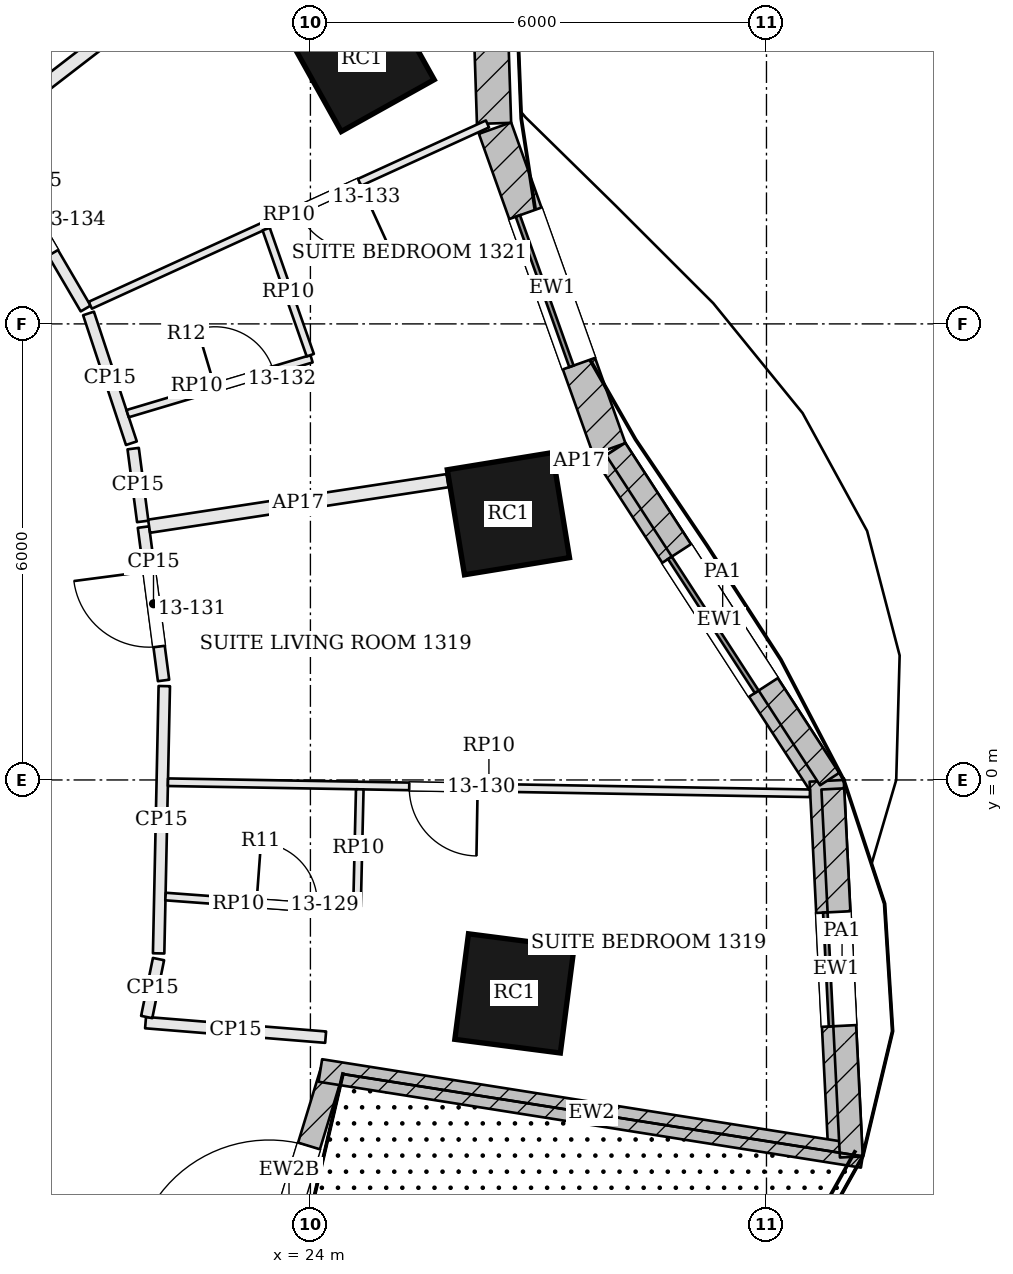
"""IFC4 building model, lengths in metres.
Left out: names, types, materials, properties, quantities, classifications, styles, units other than length and angle.
Written with IfcOpenShell. Run it as: python <this file> out.ifc"""

import sys

from ifc_helpers import new_model, si_unit, direction, frame, frame_2d, origin, origin_2d, place, context, subcontext, project, spatial, rectangle, extrude, element, fill, save


model = new_model("IFC4")
c1 = context("Model", 3, precision=1e-05, world=origin(), true_north=direction((0.0, 1.0)))
c2 = subcontext(c1, "Body", "Model", "MODEL_VIEW")
j1 = project(units=[si_unit("LENGTHUNIT", "METRE"), si_unit("PLANEANGLEUNIT", "RADIAN")], contexts=[c1])
p1 = place(None, origin())
s1 = spatial("IfcSite", under=j1, at=p1, CompositionType="ELEMENT")
p2 = place(p1, origin())
s2 = spatial("IfcBuilding", under=s1, at=p2, CompositionType="ELEMENT")
p3 = place(p2, frame((0.0, 0.0, 62.7)))
s3 = spatial("IfcBuildingStorey", under=s2, at=p3, CompositionType="ELEMENT", Elevation=62.7)
for number, where, z_axis, x_axis in (
    (1, (26.605, 3.503, 0.0), (0.0, 0.0, 1.0), (-0.161, 0.987, 0.0)),
    (2, (24.676, 9.483, 0.0), (0.0, 0.0, 1.0), (-0.487, 0.873, 0.0)),
    (3, (26.684, -2.808, 0.0), (0.0, 0.0, 1.0), (0.128, 0.992, 0.0)),
):
    element("IfcColumn", number, at=place(p3, frame(where, z_axis=z_axis, x_axis=x_axis)), inside=s3, PredefinedType="COLUMN", context=c2, shape_type="SweptSolid", body=[
        extrude(rectangle(XDim=1.4, YDim=1.4, at=origin_2d()), origin(), (0.0, 0.0, 1.0), 3.6),
    ])
p4 = place(p3, frame((30.825, -0.117, 0.0), z_axis=(0.0, 0.0, 1.0), x_axis=(-0.543975629516, 0.839101015666, 0.0)))
e4 = element("IfcWall", 4, at=p4, inside=s3, PredefinedType="SOLIDWALL", context=c2, shape_type="SweptSolid", body=[
    extrude(rectangle(XDim=5.281, YDim=0.45, at=frame_2d((2.641, 0.0))), origin(), (0.0, 0.0, 1.0), 3.4),
])
p5 = place(p4, frame((1.591, 0.0, 0.9)))
e5 = element("IfcOpeningElement", 5, at=p5, cuts=e4, PredefinedType="OPENING", context=c2, shape_type="SweptSolid", body=[
    extrude(rectangle(XDim=2.1, YDim=2.0, at=frame_2d((1.05, 1.0))), frame((0.0, 0.235, 0.0), z_axis=(0.0, -1.0, 0.0), x_axis=(1.0, 0.0, 0.0)), (0.0, 0.0, 1.0), 0.47),
])
p6 = place(p3, frame((27.933, 4.356, 0.0), z_axis=(0.0, 0.0, 1.0), x_axis=(-0.335746005454, 0.941952557097, 0.0)))
e6 = element("IfcWall", 6, at=p6, inside=s3, PredefinedType="SOLIDWALL", context=c2, shape_type="SweptSolid", body=[
    extrude(rectangle(XDim=4.48, YDim=0.45, at=frame_2d((2.24, 0.0))), origin(), (0.0, 0.0, 1.0), 3.4),
])
p7 = place(p6, frame((1.19, 0.0, 0.9)))
e7 = element("IfcOpeningElement", 7, at=p7, cuts=e6, PredefinedType="OPENING", context=c2, shape_type="SweptSolid", body=[
    extrude(rectangle(XDim=2.1, YDim=2.0, at=frame_2d((1.05, 1.0))), frame((0.0, 0.235, 0.0), z_axis=(0.0, -1.0, 0.0), x_axis=(1.0, 0.0, 0.0)), (0.0, 0.0, 1.0), 0.47),
])
p8 = place(p3, frame((26.416, 8.638, 0.0), z_axis=(0.0, 0.0, 1.0), x_axis=(-0.03254979302, 0.999470115098, 0.0)))
e8 = element("IfcWall", 8, at=p8, inside=s3, PredefinedType="SOLIDWALL", context=c2, shape_type="SweptSolid", body=[
    extrude(rectangle(XDim=4.845, YDim=0.45, at=frame_2d((2.423, 0.0))), origin(), (0.0, 0.0, 1.0), 3.4),
])
p9 = place(p8, frame((1.373, 0.0, 0.9)))
e9 = element("IfcOpeningElement", 9, at=p9, cuts=e8, PredefinedType="OPENING", context=c2, shape_type="SweptSolid", body=[
    extrude(rectangle(XDim=2.1, YDim=2.0, at=frame_2d((1.05, 1.0))), frame((0.0, 0.235, 0.0), z_axis=(0.0, -1.0, 0.0), x_axis=(1.0, 0.0, 0.0)), (0.0, 0.0, 1.0), 0.47),
])
p10 = place(p3, frame((23.154, -7.526, 0.0), z_axis=(0.0, 0.0, 1.0), x_axis=(0.291992516149, 0.95642060335, 0.0)))
e10 = element("IfcWall", 10, at=p10, inside=s3, PredefinedType="SOLIDWALL", context=c2, shape_type="SweptSolid", body=[
    extrude(rectangle(XDim=3.87, YDim=0.3, at=frame_2d((1.935, 0.0))), origin(), (0.0, 0.0, 1.0), 3.4),
])
p11 = place(p10, frame((1.035, 0.0, 0.0)))
e11 = element("IfcOpeningElement", 11, at=p11, cuts=e10, PredefinedType="OPENING", context=c2, shape_type="SweptSolid", body=[
    extrude(rectangle(XDim=1.8, YDim=2.4, at=frame_2d((0.9, 1.2))), frame((0.0, 0.16, 0.0), z_axis=(0.0, -1.0, 0.0), x_axis=(1.0, 0.0, 0.0)), (0.0, 0.0, 1.0), 0.32),
])
p12 = place(p3, frame((31.041, -4.963, 0.0), z_axis=(0.0, 0.0, 1.0), x_axis=(-0.050222481563, 0.99873805492, 0.0)))
e12 = element("IfcWall", 12, at=p12, inside=s3, PredefinedType="SOLIDWALL", context=c2, shape_type="SweptSolid", body=[
    extrude(rectangle(XDim=4.958, YDim=0.45, at=frame_2d((2.479, 0.0))), origin(), (0.0, 0.0, 1.0), 3.4),
])
p13 = place(p12, frame((1.729, 0.0, 0.9)))
e13 = element("IfcOpeningElement", 13, at=p13, cuts=e12, PredefinedType="OPENING", context=c2, shape_type="SweptSolid", body=[
    extrude(rectangle(XDim=1.5, YDim=2.0, at=frame_2d((0.75, 1.0))), frame((0.0, 0.235, 0.0), z_axis=(0.0, -1.0, 0.0), x_axis=(1.0, 0.0, 0.0)), (0.0, 0.0, 1.0), 0.47),
])
p14 = place(p3, frame((31.266, -4.952, 0.0), z_axis=(0.0, 0.0, 1.0), x_axis=(-0.987694094153, 0.156398134182, 0.0)))
e14 = element("IfcWall", 14, at=p14, inside=s3, PredefinedType="SOLIDWALL", context=c2, shape_type="SweptSolid", body=[
    extrude(rectangle(XDim=7.224, YDim=0.3, at=frame_2d((3.612, 0.0))), origin(), (0.0, 0.0, 1.0), 2.954),
])
p15 = place(p3, frame((30.831, 0.011, 3.6), z_axis=(0.0, 0.0, 1.0), x_axis=(-0.543918219167, 0.839138231079, 0.0)))
e15 = element("IfcWall", 15, at=p15, inside=s3, PredefinedType="PARAPET", context=c2, shape_type="SweptSolid", body=[
    extrude(rectangle(XDim=5.174, YDim=0.3, at=frame_2d((2.587, 0.0))), origin(), (0.0, 0.0, 1.0), 1.1),
])
p16 = place(p3, frame((31.116, -4.959, 3.6), z_axis=(0.0, 0.0, 1.0), x_axis=(-0.05021140618, 0.998738611795, 0.0)))
e16 = element("IfcWall", 16, at=p16, inside=s3, PredefinedType="PARAPET", context=c2, shape_type="SweptSolid", body=[
    extrude(rectangle(XDim=4.848, YDim=0.3, at=frame_2d((2.424, 0.0))), origin(), (0.0, 0.0, 1.0), 1.1),
])
p17 = place(p3, frame((26.021, 13.398, 0.0), z_axis=(0.0, 0.0, 1.0), x_axis=(-0.791914254245, -0.610632306649, 0.0)))
e17 = element("IfcWall", 17, at=p17, inside=s3, PredefinedType="PARTITIONING", context=c2, shape_type="SweptSolid", body=[
    extrude(rectangle(XDim=7.922, YDim=0.175, at=frame_2d((3.961, 0.0))), origin(), (0.0, 0.0, 1.0), 2.68),
])
p18 = place(p3, frame((24.2, -3.384, 0.0), z_axis=(0.0, 0.0, 1.0), x_axis=(-0.996744013328, 0.080631085167, 0.0)))
e18 = element("IfcWall", 18, at=p18, inside=s3, PredefinedType="PARTITIONING", context=c2, shape_type="SweptSolid", body=[
    extrude(rectangle(XDim=2.377, YDim=0.15, at=frame_2d((1.188, 0.0))), origin(), (0.0, 0.0, 1.0), 2.68),
])
p19 = place(p3, frame((21.846, -3.119, 0.0), z_axis=(0.0, 0.0, 1.0), x_axis=(0.19991696998, 0.979812841881, 0.0)))
e19 = element("IfcWall", 19, at=p19, inside=s3, PredefinedType="PARTITIONING", context=c2, shape_type="SweptSolid", body=[
    extrude(rectangle(XDim=0.778, YDim=0.15, at=frame_2d((0.389, 0.0))), origin(), (0.0, 0.0, 1.0), 2.68),
])
p20 = place(p3, frame((22.003, -2.281, 0.0), z_axis=(0.0, 0.0, 1.0), x_axis=(0.021172866829, 0.999775829729, 0.0)))
e20 = element("IfcWall", 20, at=p20, inside=s3, PredefinedType="PARTITIONING", context=c2, shape_type="SweptSolid", body=[
    extrude(rectangle(XDim=3.517, YDim=0.15, at=frame_2d((1.758, 0.0))), origin(), (0.0, 0.0, 1.0), 2.68),
])
p21 = place(p3, frame((22.068, 1.309, 0.0), z_axis=(0.0, 0.0, 1.0), x_axis=(-0.129923831537, 0.991523977521, 0.0)))
e21 = element("IfcWall", 21, at=p21, inside=s3, PredefinedType="PARTITIONING", context=c2, shape_type="SweptSolid", body=[
    extrude(rectangle(XDim=2.035, YDim=0.15, at=frame_2d((1.018, 0.0))), origin(), (0.0, 0.0, 1.0), 2.68),
])
p22 = place(p21, frame((0.45, 0.0, 0.0)))
e22 = element("IfcOpeningElement", 22, at=p22, cuts=e21, PredefinedType="OPENING", context=c2, shape_type="SweptSolid", body=[
    extrude(rectangle(XDim=1.0, YDim=2.1, at=frame_2d((0.5, 1.05))), frame((0.0, 0.085, 0.0), z_axis=(0.0, -1.0, 0.0), x_axis=(1.0, 0.0, 0.0)), (0.0, 0.0, 1.0), 0.17),
])
p23 = place(p3, frame((27.845, 4.249, 0.0), z_axis=(0.0, 0.0, 1.0), x_axis=(-0.988533937995, -0.15099885242, 0.0)))
e23 = element("IfcWall", 23, at=p23, inside=s3, PredefinedType="PARTITIONING", context=c2, shape_type="SweptSolid", body=[
    extrude(rectangle(XDim=0.624, YDim=0.175, at=frame_2d((0.312, 0.0))), origin(), (0.0, 0.0, 1.0), 2.68),
])
p24 = place(p3, frame((25.804, 3.938, 0.0), z_axis=(0.0, 0.0, 1.0), x_axis=(-0.988543004534, -0.150939485181, 0.0)))
e24 = element("IfcWall", 24, at=p24, inside=s3, PredefinedType="PARTITIONING", context=c2, shape_type="SweptSolid", body=[
    extrude(rectangle(XDim=3.972, YDim=0.175, at=frame_2d((1.986, 0.0))), origin(), (0.0, 0.0, 1.0), 2.68),
])
p25 = place(p3, frame((21.794, 3.401, 0.0), z_axis=(0.0, 0.0, 1.0), x_axis=(-0.129911835925, 0.991525549286, 0.0)))
e25 = element("IfcWall", 25, at=p25, inside=s3, PredefinedType="PARTITIONING", context=c2, shape_type="SweptSolid", body=[
    extrude(rectangle(XDim=0.966, YDim=0.15, at=frame_2d((0.483, 0.0))), origin(), (0.0, 0.0, 1.0), 2.68),
])
p26 = place(p3, frame((21.645, 4.43, 0.0), z_axis=(0.0, 0.0, 1.0), x_axis=(-0.313700743044, 0.949521902756, 0.0)))
e26 = element("IfcWall", 26, at=p26, inside=s3, PredefinedType="PARTITIONING", context=c2, shape_type="SweptSolid", body=[
    extrude(rectangle(XDim=1.798, YDim=0.15, at=frame_2d((0.899, 0.0))), origin(), (0.0, 0.0, 1.0), 2.68),
])
p27 = place(p3, frame((21.043, 6.202, 0.0), z_axis=(0.0, 0.0, 1.0), x_axis=(-0.50523366897, 0.862982583682, 0.0)))
e27 = element("IfcWall", 27, at=p27, inside=s3, PredefinedType="PARTITIONING", context=c2, shape_type="SweptSolid", body=[
    extrude(rectangle(XDim=2.605, YDim=0.15, at=frame_2d((1.303, 0.0))), origin(), (0.0, 0.0, 1.0), 2.68),
])
p28 = place(p27, frame((0.848, 0.0, 0.0)))
e28 = element("IfcOpeningElement", 28, at=p28, cuts=e27, PredefinedType="OPENING", context=c2, shape_type="SweptSolid", body=[
    extrude(rectangle(XDim=1.0, YDim=2.1, at=frame_2d((0.5, 1.05))), frame((0.0, 0.085, 0.0), z_axis=(0.0, -1.0, 0.0), x_axis=(1.0, 0.0, 0.0)), (0.0, 0.0, 1.0), 0.17),
])
p29 = place(p3, frame((30.571, -0.175, 0.0), z_axis=(0.0, 0.0, 1.0), x_axis=(-0.999851615206, 0.017226362636, 0.0)))
e29 = element("IfcWall", 29, at=p29, inside=s3, PredefinedType="PARTITIONING", context=c2, shape_type="SweptSolid", body=[
    extrude(rectangle(XDim=8.447, YDim=0.1, at=frame_2d((4.223, 0.0))), origin(), (0.0, 0.0, 1.0), 2.68),
])
p30 = place(p29, frame((4.372, 0.0, 0.0)))
e30 = element("IfcOpeningElement", 30, at=p30, cuts=e29, PredefinedType="OPENING", context=c2, shape_type="SweptSolid", body=[
    extrude(rectangle(XDim=0.9, YDim=2.4, at=frame_2d((0.45, 1.2))), frame((0.0, 0.06, 0.0), z_axis=(0.0, -1.0, 0.0), x_axis=(1.0, 0.0, 0.0)), (0.0, 0.0, 1.0), 0.12),
])
p31 = place(p3, frame((22.094, -1.534, 0.0), z_axis=(0.0, 0.0, 1.0), x_axis=(0.99730377649, -0.073383767945, 0.0)))
e31 = element("IfcWall", 31, at=p31, inside=s3, PredefinedType="PARTITIONING", context=c2, shape_type="SweptSolid", body=[
    extrude(rectangle(XDim=2.525, YDim=0.1, at=frame_2d((1.263, 0.0))), origin(), (0.0, 0.0, 1.0), 2.68),
])
p32 = place(p31, frame((1.2, 0.0, 0.0)))
e32 = element("IfcOpeningElement", 32, at=p32, cuts=e31, PredefinedType="OPENING", context=c2, shape_type="SweptSolid", body=[
    extrude(rectangle(XDim=0.8, YDim=2.1, at=frame_2d((0.4, 1.05))), frame((0.0, 0.06, 0.0), z_axis=(0.0, -1.0, 0.0), x_axis=(1.0, 0.0, 0.0)), (0.0, 0.0, 1.0), 0.12),
])
p33 = place(p3, frame((24.613, -1.669, 0.0), z_axis=(0.0, 0.0, 1.0), x_axis=(0.023209160262, 0.99973063116, 0.0)))
e33 = element("IfcWall", 33, at=p33, inside=s3, PredefinedType="PARTITIONING", context=c2, shape_type="SweptSolid", body=[
    extrude(rectangle(XDim=1.546, YDim=0.1, at=frame_2d((0.773, 0.0))), origin(), (0.0, 0.0, 1.0), 2.68),
])
p34 = place(p3, frame((26.329, 8.631, 0.0), z_axis=(0.0, 0.0, 1.0), x_axis=(-0.909688352961, -0.415291584899, 0.0)))
e34 = element("IfcWall", 34, at=p34, inside=s3, PredefinedType="PARTITIONING", context=c2, shape_type="SweptSolid", body=[
    extrude(rectangle(XDim=5.744, YDim=0.1, at=frame_2d((2.872, 0.0))), origin(), (0.0, 0.0, 1.0), 2.68),
])
p35 = place(p34, frame((1.85, 0.0, 0.0)))
e35 = element("IfcOpeningElement", 35, at=p35, cuts=e34, PredefinedType="OPENING", context=c2, shape_type="SweptSolid", body=[
    extrude(rectangle(XDim=0.9, YDim=2.4, at=frame_2d((0.45, 1.2))), frame((0.0, 0.06, 0.0), z_axis=(0.0, -1.0, 0.0), x_axis=(1.0, 0.0, 0.0)), (0.0, 0.0, 1.0), 0.12),
])
p36 = place(p3, frame((21.595, 4.819, 0.0), z_axis=(0.0, 0.0, 1.0), x_axis=(0.958232459865, 0.285990476872, 0.0)))
e36 = element("IfcWall", 36, at=p36, inside=s3, PredefinedType="PARTITIONING", context=c2, shape_type="SweptSolid", body=[
    extrude(rectangle(XDim=2.525, YDim=0.1, at=frame_2d((1.263, 0.0))), origin(), (0.0, 0.0, 1.0), 2.68),
])
p37 = place(p36, frame((1.2, 0.0, 0.0)))
e37 = element("IfcOpeningElement", 37, at=p37, cuts=e36, PredefinedType="OPENING", context=c2, shape_type="SweptSolid", body=[
    extrude(rectangle(XDim=0.8, YDim=2.1, at=frame_2d((0.4, 1.05))), frame((0.0, 0.06, 0.0), z_axis=(0.0, -1.0, 0.0), x_axis=(1.0, 0.0, 0.0)), (0.0, 0.0, 1.0), 0.12),
])
p38 = place(p3, frame((23.998, 5.588, 0.0), z_axis=(0.0, 0.0, 1.0), x_axis=(-0.33036280106, 0.943854024559, 0.0)))
e38 = element("IfcWall", 38, at=p38, inside=s3, PredefinedType="PARTITIONING", context=c2, shape_type="SweptSolid", body=[
    extrude(rectangle(XDim=1.757, YDim=0.1, at=frame_2d((0.879, 0.0))), origin(), (0.0, 0.0, 1.0), 2.68),
])
p39 = place(p5, origin())
e39 = element("IfcWindow", 39, at=p39, inside=s3, PartitioningType="SINGLE_PANEL", PredefinedType="WINDOW", context=c2, shape_type="SweptSolid", body=[
    extrude(rectangle(XDim=2.1, YDim=2.0, at=frame_2d((1.05, 1.0))), frame((0.0, 0.135, 0.0), z_axis=(0.0, -1.0, 0.0), x_axis=(1.0, 0.0, 0.0)), (0.0, 0.0, 1.0), 0.06),
])
fill(e5, e39)
p40 = place(p7, origin())
e40 = element("IfcWindow", 40, at=p40, inside=s3, PartitioningType="SINGLE_PANEL", PredefinedType="WINDOW", context=c2, shape_type="SweptSolid", body=[
    extrude(rectangle(XDim=2.1, YDim=2.0, at=frame_2d((1.05, 1.0))), frame((0.0, 0.135, 0.0), z_axis=(0.0, -1.0, 0.0), x_axis=(1.0, 0.0, 0.0)), (0.0, 0.0, 1.0), 0.06),
])
fill(e7, e40)
p41 = place(p11, origin())
e41 = element("IfcDoor", 41, at=p41, inside=s3, OperationType="DOUBLE_DOOR_DOUBLE_SWING", PredefinedType="DOOR", context=c2, shape_type="SweptSolid", body=[
    extrude(rectangle(XDim=1.8, YDim=2.4, at=frame_2d((0.9, 1.2))), frame((0.0, 0.025, 0.0), z_axis=(0.0, -1.0, 0.0), x_axis=(1.0, 0.0, 0.0)), (0.0, 0.0, 1.0), 0.05),
])
fill(e11, e41)
p42 = place(p13, origin())
e42 = element("IfcWindow", 42, at=p42, inside=s3, PartitioningType="SINGLE_PANEL", PredefinedType="WINDOW", context=c2, shape_type="SweptSolid", body=[
    extrude(rectangle(XDim=1.5, YDim=2.0, at=frame_2d((0.75, 1.0))), frame((0.0, 0.135, 0.0), z_axis=(0.0, -1.0, 0.0), x_axis=(1.0, 0.0, 0.0)), (0.0, 0.0, 1.0), 0.06),
])
fill(e13, e42)
p43 = place(p32, origin())
e43 = element("IfcDoor", 43, at=p43, inside=s3, OperationType="SINGLE_SWING_LEFT", PredefinedType="DOOR", context=c2, shape_type="SweptSolid", body=[
    extrude(rectangle(XDim=0.8, YDim=2.1, at=frame_2d((0.4, 1.05))), frame((0.0, 0.025, 0.0), z_axis=(0.0, -1.0, 0.0), x_axis=(1.0, 0.0, 0.0)), (0.0, 0.0, 1.0), 0.05),
])
fill(e32, e43)
p44 = place(p30, origin())
e44 = element("IfcDoor", 44, at=p44, inside=s3, OperationType="SINGLE_SWING_LEFT", PredefinedType="DOOR", context=c2, shape_type="SweptSolid", body=[
    extrude(rectangle(XDim=0.9, YDim=2.4, at=frame_2d((0.45, 1.2))), frame((0.0, 0.025, 0.0), z_axis=(0.0, -1.0, 0.0), x_axis=(1.0, 0.0, 0.0)), (0.0, 0.0, 1.0), 0.05),
])
fill(e30, e44)
p45 = place(p22, origin())
e45 = element("IfcDoor", 45, at=p45, inside=s3, OperationType="SINGLE_SWING_RIGHT", PredefinedType="DOOR", context=c2, shape_type="SweptSolid", body=[
    extrude(rectangle(XDim=1.0, YDim=2.1, at=frame_2d((0.5, 1.05))), frame((0.0, 0.025, 0.0), z_axis=(0.0, -1.0, 0.0), x_axis=(1.0, 0.0, 0.0)), (0.0, 0.0, 1.0), 0.05),
])
fill(e22, e45)
p46 = place(p37, origin())
e46 = element("IfcDoor", 46, at=p46, inside=s3, OperationType="SINGLE_SWING_LEFT", PredefinedType="DOOR", context=c2, shape_type="SweptSolid", body=[
    extrude(rectangle(XDim=0.8, YDim=2.1, at=frame_2d((0.4, 1.05))), frame((0.0, 0.025, 0.0), z_axis=(0.0, -1.0, 0.0), x_axis=(1.0, 0.0, 0.0)), (0.0, 0.0, 1.0), 0.05),
])
fill(e37, e46)
p47 = place(p35, origin())
e47 = element("IfcDoor", 47, at=p47, inside=s3, OperationType="SINGLE_SWING_LEFT", PredefinedType="DOOR", context=c2, shape_type="SweptSolid", body=[
    extrude(rectangle(XDim=0.9, YDim=2.4, at=frame_2d((0.45, 1.2))), frame((0.0, 0.025, 0.0), z_axis=(0.0, -1.0, 0.0), x_axis=(1.0, 0.0, 0.0)), (0.0, 0.0, 1.0), 0.05),
])
fill(e35, e47)
p48 = place(p28, origin())
e48 = element("IfcDoor", 48, at=p48, inside=s3, OperationType="SINGLE_SWING_RIGHT", PredefinedType="DOOR", context=c2, shape_type="SweptSolid", body=[
    extrude(rectangle(XDim=1.0, YDim=2.1, at=frame_2d((0.5, 1.05))), frame((0.0, 0.025, 0.0), z_axis=(0.0, -1.0, 0.0), x_axis=(1.0, 0.0, 0.0)), (0.0, 0.0, 1.0), 0.05),
])
fill(e28, e48)
save(model, sys.argv[1])
